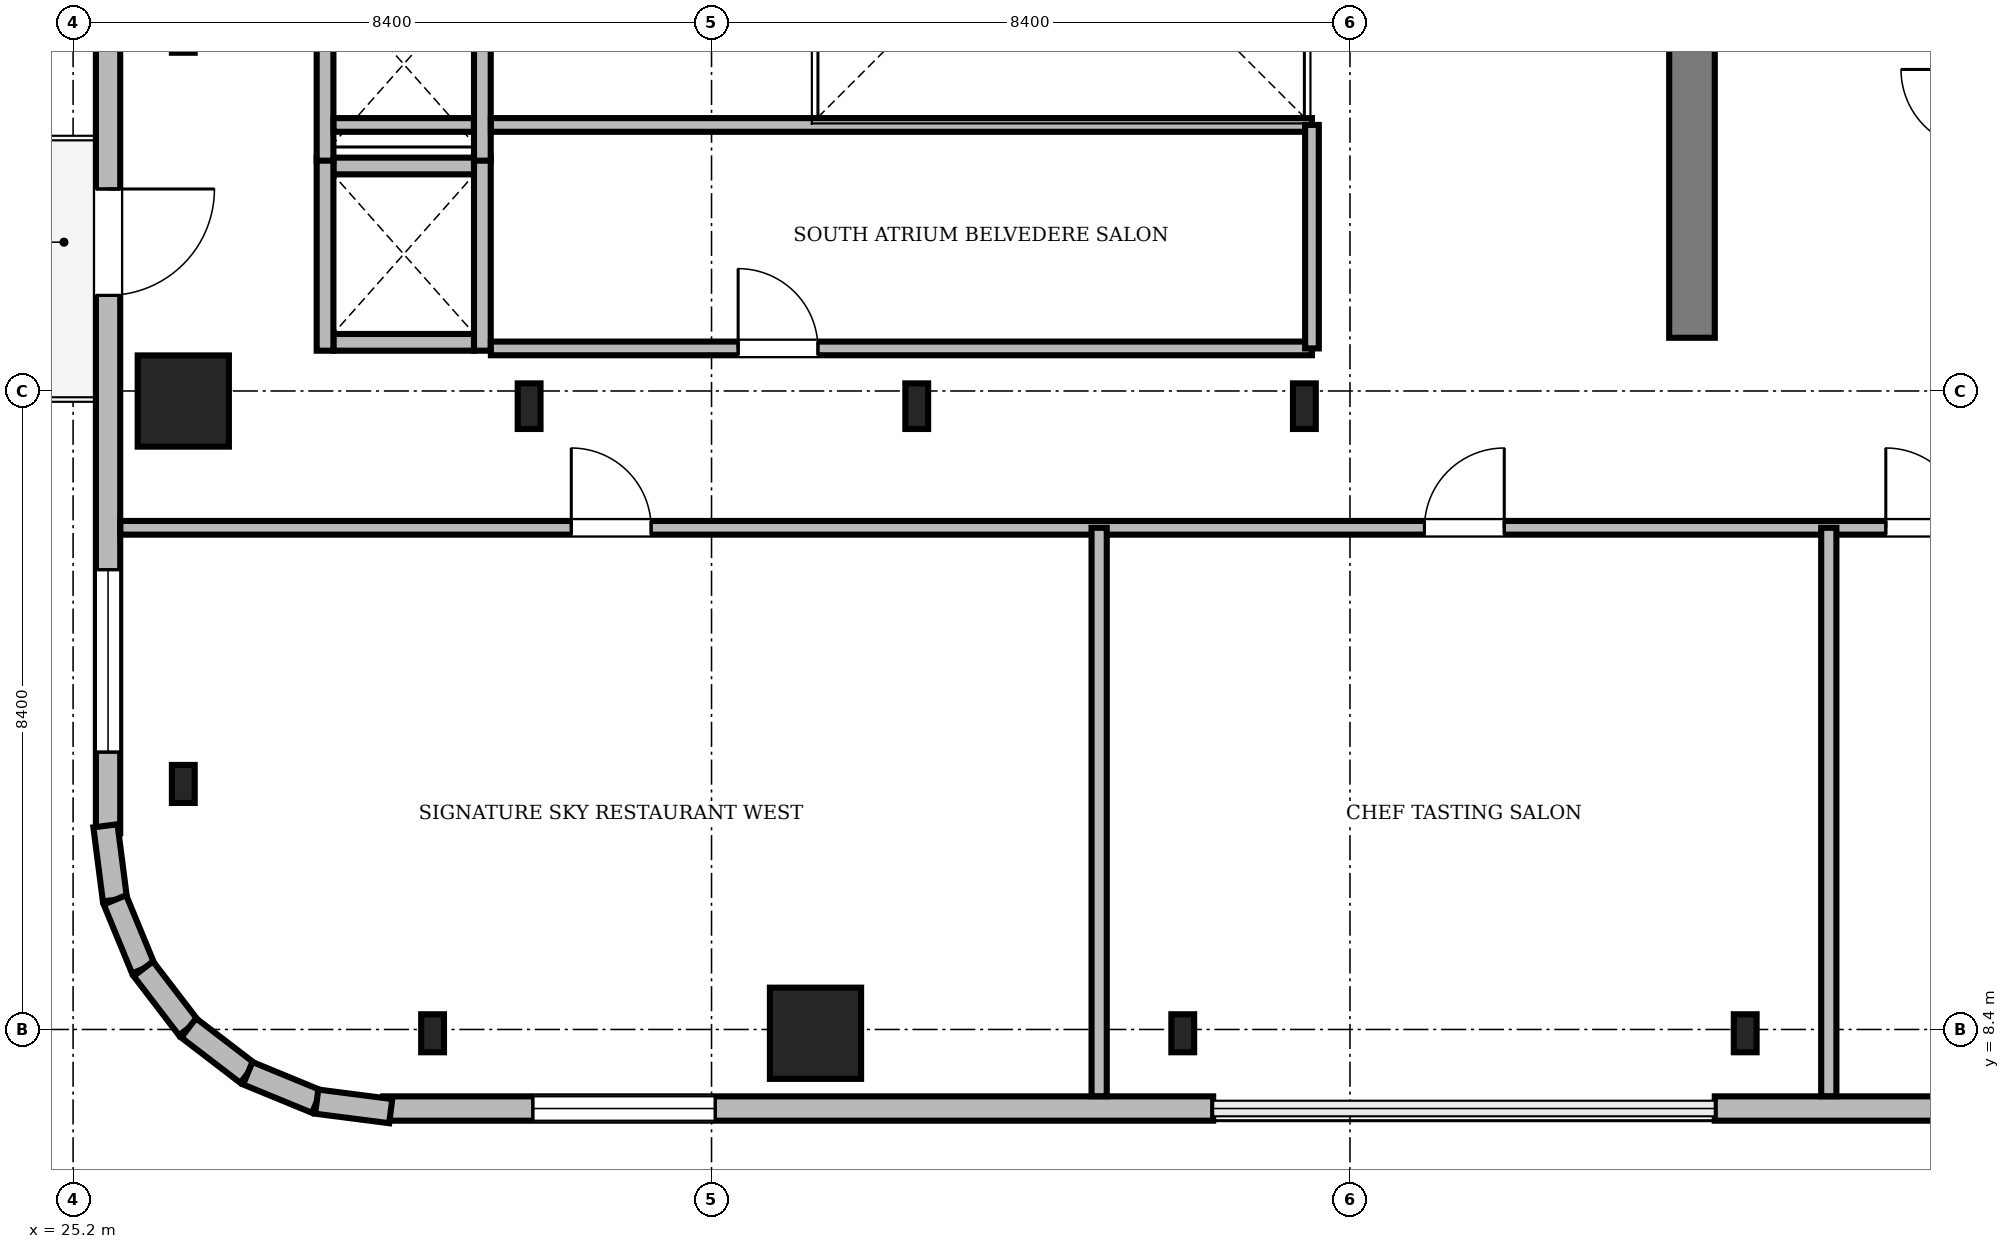
"""IFC4 building model, lengths in metres.
Left out: names, types, materials, properties, quantities, classifications, styles, units other than length and angle.
Written with IfcOpenShell. Run it as: python <this file> out.ifc"""

import sys

from ifc_helpers import new_model, si_unit, direction, frame, frame_2d, origin, origin_2d, place, context, subcontext, project, spatial, rectangle, i_section, extrude, source, transform, mapped, element, fill, save


model = new_model("IFC4")
c1 = context("Model", 3, precision=1e-05, world=origin(), true_north=direction((0.0, 1.0)))
c2 = subcontext(c1, "Body", "Model", "MODEL_VIEW")
j1 = project(units=[si_unit("LENGTHUNIT", "METRE"), si_unit("PLANEANGLEUNIT", "RADIAN")], contexts=[c1])
p1 = place(None, origin())
s1 = spatial("IfcSite", under=j1, at=p1, CompositionType="ELEMENT")
p2 = place(p1, origin())
s2 = spatial("IfcBuilding", under=s1, at=p2, CompositionType="ELEMENT")
p3 = place(p2, frame((0.0, 0.0, 296.15)))
s3 = spatial("IfcBuildingStorey", under=s2, at=p3, CompositionType="ELEMENT", Elevation=296.15)
m1 = source(origin(), c2, "Body", "SweptSolid", [
    extrude(rectangle(XDim=13.15, YDim=0.6, at=frame_2d((6.575, 0.0))), origin(), (0.0, 0.0, 1.0), 4.7),
])
p4 = place(p3, frame((46.5, 17.5, 0.0), z_axis=(0.0, 0.0, 1.0), x_axis=(0.0, 1.0, 0.0)))
e1 = element("IfcWall", 1, at=p4, inside=s3, PredefinedType="SHEAR", context=c2, shape_type="MappedRepresentation", body=[
    mapped(m1, transform((0.0, 0.0, 0.0), scale=1.0)),
])
m2 = source(origin(), c2, "Body", "SweptSolid", [
    extrude(i_section(OverallWidth=0.3, OverallDepth=0.6, WebThickness=0.015, FlangeThickness=0.03, FilletRadius=0.027, at=origin_2d()), origin(), (0.0, 0.0, 1.0), 4.7),
])
for number, where, z_axis, x_axis in (
    (2, (31.2, 16.6, 0.0), (0.0, 0.0, 1.0), (1.0, 0.0, 0.0)),
    (3, (36.3, 16.6, 0.0), (0.0, 0.0, 1.0), (1.0, 0.0, 0.0)),
    (4, (41.4, 16.6, 0.0), (0.0, 0.0, 1.0), (1.0, 0.0, 0.0)),
):
    element("IfcColumn", number, at=place(p3, frame(where, z_axis=z_axis, x_axis=x_axis)), inside=s3, PredefinedType="COLUMN", context=c2, shape_type="MappedRepresentation", body=[
        mapped(m2, transform((0.0, 0.0, 0.0), scale=1.0)),
    ])
m3 = source(origin(), c2, "Body", "SweptSolid", [
    extrude(rectangle(XDim=1.2, YDim=1.2, at=origin_2d()), origin(), (0.0, 0.0, 1.0), 4.738),
])
for number, where, z_axis, x_axis in (
    (5, (34.968, 8.35, 0.0), (0.054, 0.114, 0.992), (-0.903, 0.429, 0.0)),
    (6, (26.65, 16.668, 0.0), (0.114, 0.054, 0.992), (-0.429, 0.903, 0.0)),
):
    element("IfcColumn", number, at=place(p3, frame(where, z_axis=z_axis, x_axis=x_axis)), inside=s3, PredefinedType="COLUMN", context=c2, shape_type="MappedRepresentation", body=[
        mapped(m3, transform((0.0, 0.0, 0.0), scale=1.0)),
    ])
m4 = source(origin(), c2, "Body", "SweptSolid", [
    extrude(i_section(OverallWidth=0.3, OverallDepth=0.5, WebThickness=0.014, FlangeThickness=0.028, FilletRadius=0.027, at=origin_2d()), origin(), (0.0, 0.0, 1.0), 4.75),
])
p5 = place(p3, frame((29.93, 8.35, 0.0), z_axis=(0.089889082184, 0.113633368044, 0.989448033285), x_axis=(-0.784283129619, 0.620403072684, 0.0)))
e7 = element("IfcColumn", 7, at=p5, inside=s3, PredefinedType="COLUMN", context=c2, shape_type="MappedRepresentation", body=[
    mapped(m4, transform((0.0, 0.0, 0.0), scale=1.0)),
])
m5 = source(origin(), c2, "Body", "SweptSolid", [
    extrude(i_section(OverallWidth=0.3, OverallDepth=0.5, WebThickness=0.014, FlangeThickness=0.028, FilletRadius=0.027, at=origin_2d()), origin(), (0.0, 0.0, 1.0), 4.731),
])
for number, where, z_axis, x_axis in (
    (8, (39.8, 8.35, 0.0), (0.0, 0.114, 0.993), (-1.0, 0.0, 0.0)),
    (9, (47.2, 8.35, 0.0), (0.0, 0.114, 0.993), (-1.0, 0.0, 0.0)),
):
    element("IfcColumn", number, at=place(p3, frame(where, z_axis=z_axis, x_axis=x_axis)), inside=s3, PredefinedType="COLUMN", context=c2, shape_type="MappedRepresentation", body=[
        mapped(m5, transform((0.0, 0.0, 0.0), scale=1.0)),
    ])
p6 = place(p3, frame((26.65, 11.63, 0.0), z_axis=(0.113684098524, 0.089888557106, 0.989442253517), x_axis=(-0.620230509589, 0.784419603895, 0.0)))
e10 = element("IfcColumn", 10, at=p6, inside=s3, PredefinedType="COLUMN", context=c2, shape_type="MappedRepresentation", body=[
    mapped(m4, transform((0.0, 0.0, 0.0), scale=1.0)),
])
m6 = source(origin(), c2, "Body", "SweptSolid", [
    extrude(rectangle(XDim=10.92, YDim=0.32, at=frame_2d((5.46, 0.0))), origin(), (0.0, 0.0, 1.0), 4.7),
])
p7 = place(p3, frame((29.28, 7.36, 0.0), z_axis=(0.0, 0.0, 1.0), x_axis=(1.0, 0.0, 0.0)))
e11 = element("IfcWall", 11, at=p7, inside=s3, PredefinedType="SOLIDWALL", context=c2, shape_type="MappedRepresentation", body=[
    mapped(m6, transform((0.0, 0.0, 0.0), scale=1.0)),
])
m7 = source(origin(), c2, "Body", "SweptSolid", [
    extrude(rectangle(XDim=2.4, YDim=3.2, at=frame_2d((1.2, 1.6))), frame((0.0, 0.17, 0.0), z_axis=(0.0, -1.0, 0.0), x_axis=(1.0, 0.0, 0.0)), (0.0, 0.0, 1.0), 0.34),
])
p8 = place(p7, frame((1.969, 0.0, 0.72)))
e12 = element("IfcOpeningElement", 12, at=p8, cuts=e11, PredefinedType="OPENING", context=c2, shape_type="MappedRepresentation", body=[
    mapped(m7, transform((0.0, 0.0, 0.0), scale=1.0)),
])
p9 = place(p3, frame((46.8, 7.36, 0.0), z_axis=(0.0, 0.0, 1.0), x_axis=(1.0, 0.0, 0.0)))
e13 = element("IfcWall", 13, at=p9, inside=s3, PredefinedType="SOLIDWALL", context=c2, shape_type="MappedRepresentation", body=[
    mapped(m6, transform((0.0, 0.0, 0.0), scale=1.0)),
])
p10 = place(p9, frame((6.551, 0.0, 0.72)))
e14 = element("IfcOpeningElement", 14, at=p10, cuts=e13, PredefinedType="OPENING", context=c2, shape_type="MappedRepresentation", body=[
    mapped(m7, transform((0.0, 0.0, 0.0), scale=1.0)),
])
p11 = place(p3, frame((25.66, 21.9, 0.0), z_axis=(0.0, 0.0, 1.0), x_axis=(0.0, -1.0, 0.0)))
e15 = element("IfcWall", 15, at=p11, inside=s3, PredefinedType="SOLIDWALL", context=c2, shape_type="MappedRepresentation", body=[
    mapped(m6, transform((0.0, 0.0, 0.0), scale=1.0)),
])
m8 = source(origin(), c2, "Body", "SweptSolid", [
    extrude(rectangle(XDim=1.4, YDim=2.3, at=frame_2d((0.7, 1.15))), frame((0.0, 0.17, 0.0), z_axis=(0.0, -1.0, 0.0), x_axis=(1.0, 0.0, 0.0)), (0.0, 0.0, 1.0), 0.34),
])
p12 = place(p11, frame((2.442, 0.0, 0.0)))
e16 = element("IfcOpeningElement", 16, at=p12, cuts=e15, PredefinedType="OPENING", context=c2, shape_type="MappedRepresentation", body=[
    mapped(m8, transform((0.0, 0.0, 0.0), scale=1.0)),
])
p13 = place(p11, frame((7.451, 0.0, 0.72)))
e17 = element("IfcOpeningElement", 17, at=p13, cuts=e15, PredefinedType="OPENING", context=c2, shape_type="MappedRepresentation", body=[
    mapped(m7, transform((0.0, 0.0, 0.0), scale=1.0)),
])
m9 = source(origin(), c2, "Body", "SweptSolid", [
    extrude(rectangle(XDim=0.982, YDim=0.32, at=frame_2d((0.491, 0.0))), origin(), (0.0, 0.0, 1.0), 4.7),
])
p14 = place(p3, frame((25.625, 11.079, 0.0), z_axis=(0.0, 0.0, 1.0), x_axis=(0.127553190833, -0.991831731449, 0.0)))
e18 = element("IfcWall", 18, at=p14, inside=s3, PredefinedType="SOLIDWALL", context=c2, shape_type="MappedRepresentation", body=[
    mapped(m9, transform((0.0, 0.0, 0.0), scale=1.0)),
])
m10 = source(origin(), c2, "Body", "SweptSolid", [
    extrude(rectangle(XDim=0.98, YDim=0.32, at=frame_2d((0.49, 0.0))), origin(), (0.0, 0.0, 1.0), 4.7),
])
for number, where, z_axis, x_axis in (
    (19, (25.751, 10.105, 0.0), (0.0, 0.0, 1.0), (0.381, -0.925, 0.0)),
    (20, (26.124, 9.198, 0.0), (0.0, 0.0, 1.0), (0.608, -0.794, 0.0)),
):
    element("IfcWall", number, at=place(p3, frame(where, z_axis=z_axis, x_axis=x_axis)), inside=s3, PredefinedType="SOLIDWALL", context=c2, shape_type="MappedRepresentation", body=[
        mapped(m10, transform((0.0, 0.0, 0.0), scale=1.0)),
    ])
m11 = source(origin(), c2, "Body", "SweptSolid", [
    extrude(rectangle(XDim=0.98, YDim=0.32, at=frame_2d((0.49, 0.0))), origin(), (0.0, 0.0, 1.0), 4.7),
])
p15 = place(p3, frame((26.72, 8.42, 0.0), z_axis=(0.0, 0.0, 1.0), x_axis=(0.793890938557, -0.608060176033, 0.0)))
e21 = element("IfcWall", 21, at=p15, inside=s3, PredefinedType="SOLIDWALL", context=c2, shape_type="MappedRepresentation", body=[
    mapped(m11, transform((0.0, 0.0, 0.0), scale=1.0)),
])
m12 = source(origin(), c2, "Body", "SweptSolid", [
    extrude(rectangle(XDim=0.981, YDim=0.32, at=frame_2d((0.49, 0.0))), origin(), (0.0, 0.0, 1.0), 4.7),
])
p16 = place(p3, frame((27.498, 7.824, 0.0), z_axis=(0.0, 0.0, 1.0), x_axis=(0.924652322999, -0.380812396821, 0.0)))
e22 = element("IfcWall", 22, at=p16, inside=s3, PredefinedType="SOLIDWALL", context=c2, shape_type="MappedRepresentation", body=[
    mapped(m12, transform((0.0, 0.0, 0.0), scale=1.0)),
])
p17 = place(p3, frame((28.405, 7.451, 0.0), z_axis=(0.0, 0.0, 1.0), x_axis=(0.991831731449, -0.127553190833, 0.0)))
e23 = element("IfcWall", 23, at=p17, inside=s3, PredefinedType="SOLIDWALL", context=c2, shape_type="MappedRepresentation", body=[
    mapped(m9, transform((0.0, 0.0, 0.0), scale=1.0)),
])
m13 = source(origin(), c2, "Body", "SweptSolid", [
    extrude(rectangle(XDim=1.85, YDim=0.22, at=frame_2d((0.925, 0.0))), origin(), (0.0, 0.0, 1.0), 4.142),
])
for number, where, z_axis, x_axis in (
    (24, (28.625, 17.44, 0.0), (0.0, 0.0, 1.0), (1.0, 0.0, 0.0)),
    (25, (28.625, 19.76, 0.0), (0.0, 0.0, 1.0), (1.0, 0.0, 0.0)),
):
    element("IfcWall", number, at=place(p3, frame(where, z_axis=z_axis, x_axis=x_axis)), inside=s3, PredefinedType="SOLIDWALL", context=c2, shape_type="MappedRepresentation", body=[
        mapped(m13, transform((0.0, 0.0, 0.0), scale=1.0)),
    ])
m14 = source(origin(), c2, "Body", "SweptSolid", [
    extrude(rectangle(XDim=2.54, YDim=0.22, at=frame_2d((1.27, 0.0))), origin(), (0.0, 0.0, 1.0), 4.142),
])
for number, where, z_axis, x_axis in (
    (26, (28.515, 17.33, 0.0), (0.0, 0.0, 1.0), (0.0, 1.0, 0.0)),
    (27, (30.585, 17.33, 0.0), (0.0, 0.0, 1.0), (0.0, 1.0, 0.0)),
    (28, (28.515, 19.83, 0.0), (0.0, 0.0, 1.0), (0.0, 1.0, 0.0)),
):
    element("IfcWall", number, at=place(p3, frame(where, z_axis=z_axis, x_axis=x_axis)), inside=s3, PredefinedType="SOLIDWALL", context=c2, shape_type="MappedRepresentation", body=[
        mapped(m14, transform((0.0, 0.0, 0.0), scale=1.0)),
    ])
m15 = source(origin(), c2, "Body", "SweptSolid", [
    extrude(rectangle(XDim=2.54, YDim=0.22, at=frame_2d((1.27, 0.0))), origin(), (0.0, 0.0, 1.0), 4.7),
])
p18 = place(p3, frame((30.585, 19.83, 0.0), z_axis=(0.0, 0.0, 1.0), x_axis=(0.0, 1.0, 0.0)))
e29 = element("IfcWall", 29, at=p18, inside=s3, PredefinedType="SOLIDWALL", context=c2, shape_type="MappedRepresentation", body=[
    mapped(m15, transform((0.0, 0.0, 0.0), scale=1.0)),
])
m16 = source(origin(), c2, "Body", "SweptSolid", [
    extrude(rectangle(XDim=24.478, YDim=0.18, at=frame_2d((12.239, 0.0))), origin(), (0.0, 0.0, 1.0), 3.942),
])
p19 = place(p3, frame((25.822, 15.0, 0.0), z_axis=(0.0, 0.0, 1.0), x_axis=(1.0, 0.0, 0.0)))
e30 = element("IfcWall", 30, at=p19, inside=s3, PredefinedType="PARTITIONING", context=c2, shape_type="MappedRepresentation", body=[
    mapped(m16, transform((0.0, 0.0, 0.0), scale=1.0)),
])
m17 = source(origin(), c2, "Body", "SweptSolid", [
    extrude(rectangle(XDim=1.05, YDim=2.2, at=frame_2d((0.525, 1.1))), frame((0.0, 0.1, 0.0), z_axis=(0.0, -1.0, 0.0), x_axis=(1.0, 0.0, 0.0)), (0.0, 0.0, 1.0), 0.2),
])
p20 = place(p19, frame((5.933, 0.0, 0.0)))
e31 = element("IfcOpeningElement", 31, at=p20, cuts=e30, PredefinedType="OPENING", context=c2, shape_type="MappedRepresentation", body=[
    mapped(m17, transform((0.0, 0.0, 0.0), scale=1.0)),
])
p21 = place(p19, frame((17.158, 0.0, 0.0)))
e32 = element("IfcOpeningElement", 32, at=p21, cuts=e30, PredefinedType="OPENING", context=c2, shape_type="MappedRepresentation", body=[
    mapped(m17, transform((0.0, 0.0, 0.0), scale=1.0)),
])
p22 = place(p19, frame((23.228, 0.0, 0.0)))
e33 = element("IfcOpeningElement", 33, at=p22, cuts=e30, PredefinedType="OPENING", context=c2, shape_type="MappedRepresentation", body=[
    mapped(m17, transform((0.0, 0.0, 0.0), scale=1.0)),
])
m18 = source(origin(), c2, "Body", "SweptSolid", [
    extrude(rectangle(XDim=10.803, YDim=0.18, at=frame_2d((5.401, 0.0))), origin(), (0.0, 0.0, 1.0), 4.142),
])
p23 = place(p3, frame((30.697, 17.36, 0.0), z_axis=(0.0, 0.0, 1.0), x_axis=(1.0, 0.0, 0.0)))
e34 = element("IfcWall", 34, at=p23, inside=s3, PredefinedType="PARTITIONING", context=c2, shape_type="MappedRepresentation", body=[
    mapped(m18, transform((0.0, 0.0, 0.0), scale=1.0)),
])
p24 = place(p23, frame((3.253, 0.0, 0.0)))
e35 = element("IfcOpeningElement", 35, at=p24, cuts=e34, PredefinedType="OPENING", context=c2, shape_type="MappedRepresentation", body=[
    mapped(m17, transform((0.0, 0.0, 0.0), scale=1.0)),
])
m19 = source(origin(), c2, "Body", "SweptSolid", [
    extrude(rectangle(XDim=1.846, YDim=0.18, at=frame_2d((0.923, 0.0))), origin(), (0.0, 0.0, 1.0), 4.7),
])
p25 = place(p3, frame((28.627, 20.3, 0.0), z_axis=(0.0, 0.0, 1.0), x_axis=(1.0, 0.0, 0.0)))
e36 = element("IfcWall", 36, at=p25, inside=s3, PredefinedType="PARTITIONING", context=c2, shape_type="MappedRepresentation", body=[
    mapped(m19, transform((0.0, 0.0, 0.0), scale=1.0)),
])
m20 = source(origin(), c2, "Body", "SweptSolid", [
    extrude(rectangle(XDim=10.803, YDim=0.18, at=frame_2d((5.401, 0.0))), origin(), (0.0, 0.0, 1.0), 4.242),
])
p26 = place(p3, frame((30.697, 20.3, 0.0), z_axis=(0.0, 0.0, 1.0), x_axis=(1.0, 0.0, 0.0)))
e37 = element("IfcWall", 37, at=p26, inside=s3, PredefinedType="PARTITIONING", context=c2, shape_type="MappedRepresentation", body=[
    mapped(m20, transform((0.0, 0.0, 0.0), scale=1.0)),
])
m21 = source(origin(), c2, "Body", "SweptSolid", [
    extrude(rectangle(XDim=7.478, YDim=0.2, at=frame_2d((3.739, 0.0))), origin(), (0.0, 0.0, 1.0), 3.942),
])
for number, where, z_axis, x_axis in (
    (38, (38.7, 7.522, 0.0), (0.0, 0.0, 1.0), (0.0, 1.0, 0.0)),
    (39, (48.3, 7.522, 0.0), (0.0, 0.0, 1.0), (0.0, 1.0, 0.0)),
):
    element("IfcWall", number, at=place(p3, frame(where, z_axis=z_axis, x_axis=x_axis)), inside=s3, PredefinedType="PARTITIONING", context=c2, shape_type="MappedRepresentation", body=[
        mapped(m21, transform((0.0, 0.0, 0.0), scale=1.0)),
    ])
m22 = source(origin(), c2, "Body", "SweptSolid", [
    extrude(rectangle(XDim=2.94, YDim=0.18, at=frame_2d((1.47, 0.0))), origin(), (0.0, 0.0, 1.0), 4.242),
])
p27 = place(p3, frame((41.5, 17.36, 0.0), z_axis=(0.0, 0.0, 1.0), x_axis=(0.0, 1.0, 0.0)))
e40 = element("IfcWall", 40, at=p27, inside=s3, PredefinedType="PARTITIONING", context=c2, shape_type="MappedRepresentation", body=[
    mapped(m22, transform((0.0, 0.0, 0.0), scale=1.0)),
])
m23 = source(origin(), c2, "Body", "SweptSolid", [
    extrude(rectangle(XDim=2.4, YDim=3.2, at=frame_2d((1.2, 1.6))), frame((0.0, 0.03, 0.0), z_axis=(0.0, -1.0, 0.0), x_axis=(1.0, 0.0, 0.0)), (0.0, 0.0, 1.0), 0.06),
])
p28 = place(p8, origin())
e41 = element("IfcWindow", 41, at=p28, inside=s3, PartitioningType="SINGLE_PANEL", PredefinedType="WINDOW", context=c2, shape_type="MappedRepresentation", body=[
    mapped(m23, transform((0.0, 0.0, 0.0), scale=1.0)),
])
fill(e12, e41)
m24 = source(origin(), c2, "Body", "SweptSolid", [
    extrude(rectangle(XDim=1.4, YDim=2.3, at=frame_2d((0.7, 1.15))), frame((0.0, 0.025, 0.0), z_axis=(0.0, -1.0, 0.0), x_axis=(1.0, 0.0, 0.0)), (0.0, 0.0, 1.0), 0.05),
])
p29 = place(p12, frame((1.4, 0.0, 0.0), z_axis=(0.0, 0.0, 1.0), x_axis=(-1.0, 0.0, 0.0)))
e42 = element("IfcDoor", 42, at=p29, inside=s3, OperationType="DOUBLE_DOOR_SLIDING", PredefinedType="DOOR", context=c2, shape_type="MappedRepresentation", body=[
    mapped(m24, transform((0.0, 0.0, 0.0), scale=1.0)),
])
fill(e16, e42)
p30 = place(p13, origin())
e43 = element("IfcWindow", 43, at=p30, inside=s3, PartitioningType="SINGLE_PANEL", PredefinedType="WINDOW", context=c2, shape_type="MappedRepresentation", body=[
    mapped(m23, transform((0.0, 0.0, 0.0), scale=1.0)),
])
fill(e17, e43)
m25 = source(origin(), c2, "Body", "SweptSolid", [
    extrude(rectangle(XDim=1.05, YDim=2.2, at=frame_2d((0.525, 1.1))), frame((0.0, 0.025, 0.0), z_axis=(0.0, -1.0, 0.0), x_axis=(1.0, 0.0, 0.0)), (0.0, 0.0, 1.0), 0.05),
])
p31 = place(p20, origin())
e44 = element("IfcDoor", 44, at=p31, inside=s3, OperationType="SINGLE_SWING_LEFT", PredefinedType="DOOR", context=c2, shape_type="MappedRepresentation", body=[
    mapped(m25, transform((0.0, 0.0, 0.0), scale=1.0)),
])
fill(e31, e44)
p32 = place(p21, origin())
e45 = element("IfcDoor", 45, at=p32, inside=s3, OperationType="SINGLE_SWING_RIGHT", PredefinedType="DOOR", context=c2, shape_type="MappedRepresentation", body=[
    mapped(m25, transform((0.0, 0.0, 0.0), scale=1.0)),
])
fill(e32, e45)
p33 = place(p22, origin())
e46 = element("IfcDoor", 46, at=p33, inside=s3, OperationType="SINGLE_SWING_LEFT", PredefinedType="DOOR", context=c2, shape_type="MappedRepresentation", body=[
    mapped(m25, transform((0.0, 0.0, 0.0), scale=1.0)),
])
fill(e33, e46)
p34 = place(p24, origin())
e47 = element("IfcDoor", 47, at=p34, inside=s3, OperationType="SINGLE_SWING_LEFT", PredefinedType="DOOR", context=c2, shape_type="MappedRepresentation", body=[
    mapped(m25, transform((0.0, 0.0, 0.0), scale=1.0)),
])
fill(e35, e47)
save(model, sys.argv[1])
